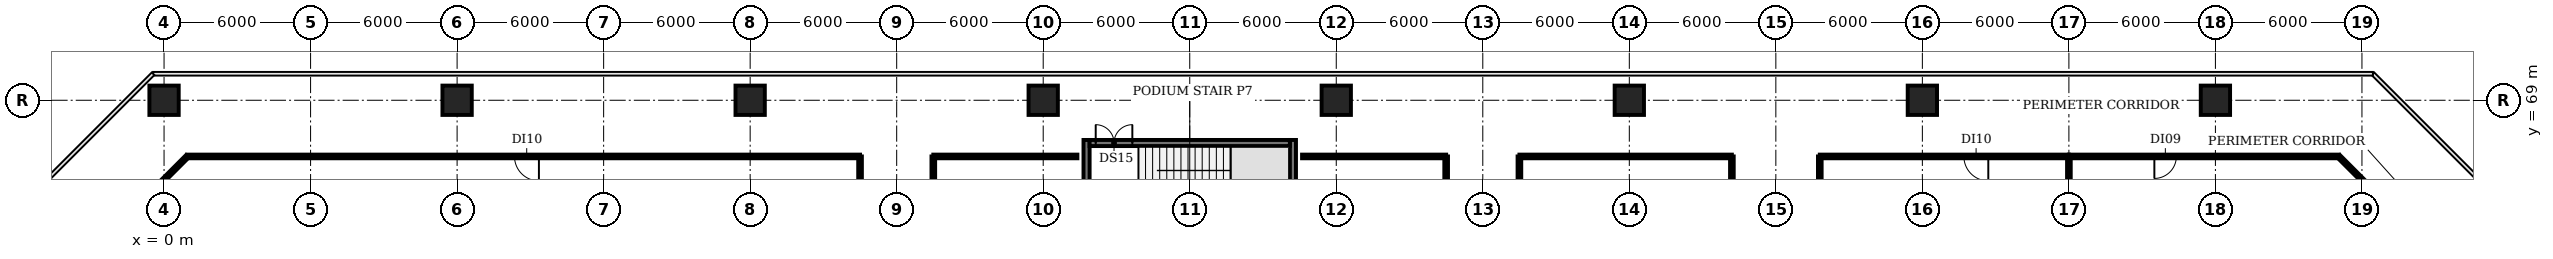
"""IFC4 building model, lengths in metres.
Left out: names, types, materials, properties, quantities, classifications, styles, units other than length and angle.
Written with IfcOpenShell. Run it as: python <this file> out.ifc"""

import sys

from ifc_helpers import new_model, si_unit, direction, frame, frame_2d, origin, origin_2d, place, context, subcontext, project, spatial, rectangle, extrude, element, fill, save


model = new_model("IFC4")
c1 = context("Model", 3, precision=1e-05, world=origin(), true_north=direction((0.0, 1.0)))
c2 = subcontext(c1, "Body", "Model", "MODEL_VIEW")
j1 = project(units=[si_unit("LENGTHUNIT", "METRE"), si_unit("PLANEANGLEUNIT", "RADIAN")], contexts=[c1])
p1 = place(None, origin())
s1 = spatial("IfcSite", under=j1, at=p1, CompositionType="ELEMENT")
p2 = place(p1, origin())
s2 = spatial("IfcBuilding", under=s1, at=p2, CompositionType="ELEMENT")
p3 = place(p2, frame((0.0, 0.0, 6.0)))
s3 = spatial("IfcBuildingStorey", under=s2, at=p3, CompositionType="ELEMENT", Elevation=6.0)
for number, where, z_axis, x_axis in (
    (1, (0.0, 69.0, 0.0), (0.0, 0.0, 1.0), (1.0, 0.0, 0.0)),
    (2, (12.0, 69.0, 0.0), (0.0, 0.0, 1.0), (1.0, 0.0, 0.0)),
    (3, (24.0, 69.0, 0.0), (0.0, 0.0, 1.0), (1.0, 0.0, 0.0)),
    (4, (36.0, 69.0, 0.0), (0.0, 0.0, 1.0), (1.0, 0.0, 0.0)),
    (5, (48.0, 69.0, 0.0), (0.0, 0.0, 1.0), (1.0, 0.0, 0.0)),
    (6, (60.0, 69.0, 0.0), (0.0, 0.0, 1.0), (1.0, 0.0, 0.0)),
    (7, (72.0, 69.0, 0.0), (0.0, 0.0, 1.0), (1.0, 0.0, 0.0)),
    (8, (84.0, 69.0, 0.0), (0.0, 0.0, 1.0), (1.0, 0.0, 0.0)),
):
    element("IfcColumn", number, at=place(p3, frame(where, z_axis=z_axis, x_axis=x_axis)), inside=s3, PredefinedType="COLUMN", context=c2, shape_type="SweptSolid", body=[
        extrude(rectangle(XDim=1.2, YDim=1.2, at=origin_2d()), origin(), (0.0, 0.0, 1.0), 4.6),
    ])
for number, where, z_axis, x_axis in (
    (9, (37.775, 62.725, 0.0), (0.0, 0.0, 1.0), (0.0, 1.0, 0.0)),
    (10, (46.225, 62.725, 0.0), (0.0, 0.0, 1.0), (0.0, 1.0, 0.0)),
):
    element("IfcWall", number, at=place(p3, frame(where, z_axis=z_axis, x_axis=x_axis)), inside=s3, PredefinedType="SHEAR", context=c2, shape_type="SweptSolid", body=[
        extrude(rectangle(XDim=4.65, YDim=0.25, at=frame_2d((2.325, 0.0))), origin(), (0.0, 0.0, 1.0), 4.6),
    ])
p4 = place(p3, frame((37.9, 67.25, 0.0), z_axis=(0.0, 0.0, 1.0), x_axis=(1.0, 0.0, 0.0)))
e11 = element("IfcWall", 11, at=p4, inside=s3, PredefinedType="SHEAR", context=c2, shape_type="SweptSolid", body=[
    extrude(rectangle(XDim=8.2, YDim=0.25, at=frame_2d((4.1, 0.0))), origin(), (0.0, 0.0, 1.0), 4.6),
])
p5 = place(p4, frame((0.25, 0.0, 0.0)))
e12 = element("IfcOpeningElement", 12, at=p5, cuts=e11, PredefinedType="OPENING", context=c2, shape_type="SweptSolid", body=[
    extrude(rectangle(XDim=1.5, YDim=2.1, at=frame_2d((0.75, 1.05))), frame((0.0, 0.135, 0.0), z_axis=(0.0, -1.0, 0.0), x_axis=(1.0, 0.0, 0.0)), (0.0, 0.0, 1.0), 0.27),
])
p6 = place(p3, frame((-4.013, 61.737, 0.0), z_axis=(0.0, 0.0, 1.0), x_axis=(0.707106781187, 0.707106781187, 0.0)))
e13 = element("IfcWall", 13, at=p6, inside=s3, PredefinedType="PARTITIONING", context=c2, shape_type="SweptSolid", body=[
    extrude(rectangle(XDim=7.019, YDim=0.15, at=frame_2d((3.51, 0.0))), origin(), (0.0, 0.0, 1.0), 3.18),
])
p7 = place(p3, frame((28.5, 61.2, 0.0), z_axis=(0.0, 0.0, 1.0), x_axis=(0.0, 1.0, 0.0)))
e14 = element("IfcWall", 14, at=p7, inside=s3, PredefinedType="PARTITIONING", context=c2, shape_type="SweptSolid", body=[
    extrude(rectangle(XDim=5.5, YDim=0.15, at=frame_2d((2.75, 0.0))), origin(), (0.0, 0.0, 1.0), 3.18),
])
p8 = place(p3, frame((28.5, 66.7, 0.0), z_axis=(0.0, 0.0, 1.0), x_axis=(-1.0, 0.0, 0.0)))
e15 = element("IfcWall", 15, at=p8, inside=s3, PredefinedType="PARTITIONING", context=c2, shape_type="SweptSolid", body=[
    extrude(rectangle(XDim=27.55, YDim=0.15, at=frame_2d((13.775, 0.0))), origin(), (0.0, 0.0, 1.0), 3.18),
])
p9 = place(p8, frame((13.15, 0.0, 0.0)))
e16 = element("IfcOpeningElement", 16, at=p9, cuts=e15, PredefinedType="OPENING", context=c2, shape_type="SweptSolid", body=[
    extrude(rectangle(XDim=1.0, YDim=2.1, at=frame_2d((0.5, 1.05))), frame((0.0, 0.085, 0.0), z_axis=(0.0, -1.0, 0.0), x_axis=(1.0, 0.0, 0.0)), (0.0, 0.0, 1.0), 0.17),
])
p10 = place(p3, frame((31.5, 54.77, 0.0), z_axis=(0.0, 0.0, 1.0), x_axis=(0.0, 1.0, 0.0)))
e17 = element("IfcWall", 17, at=p10, inside=s3, PredefinedType="PARTITIONING", context=c2, shape_type="SweptSolid", body=[
    extrude(rectangle(XDim=11.93, YDim=0.15, at=frame_2d((5.965, 0.0))), origin(), (0.0, 0.0, 1.0), 3.18),
])
p11 = place(p10, frame((5.0, 0.0, 0.0)))
e18 = element("IfcOpeningElement", 18, at=p11, cuts=e17, PredefinedType="OPENING", context=c2, shape_type="SweptSolid", body=[
    extrude(rectangle(XDim=1.8, YDim=2.1, at=frame_2d((0.9, 1.05))), frame((0.0, 0.085, 0.0), z_axis=(0.0, -1.0, 0.0), x_axis=(1.0, 0.0, 0.0)), (0.0, 0.0, 1.0), 0.17),
])
for number, where, z_axis, x_axis in (
    (19, (31.5, 66.7, 0.0), (0.0, 0.0, 1.0), (1.0, 0.0, 0.0)),
    (20, (46.6, 66.7, 0.0), (0.0, 0.0, 1.0), (1.0, 0.0, 0.0)),
):
    element("IfcWall", number, at=place(p3, frame(where, z_axis=z_axis, x_axis=x_axis)), inside=s3, PredefinedType="PARTITIONING", context=c2, shape_type="SweptSolid", body=[
        extrude(rectangle(XDim=5.9, YDim=0.15, at=frame_2d((2.95, 0.0))), origin(), (0.0, 0.0, 1.0), 3.18),
    ])
p12 = place(p3, frame((52.5, 66.7, 0.0), z_axis=(0.0, 0.0, 1.0), x_axis=(0.0, -1.0, 0.0)))
e21 = element("IfcWall", 21, at=p12, inside=s3, PredefinedType="PARTITIONING", context=c2, shape_type="SweptSolid", body=[
    extrude(rectangle(XDim=11.93, YDim=0.15, at=frame_2d((5.965, 0.0))), origin(), (0.0, 0.0, 1.0), 3.18),
])
p13 = place(p12, frame((5.0, 0.0, 0.0)))
e22 = element("IfcOpeningElement", 22, at=p13, cuts=e21, PredefinedType="OPENING", context=c2, shape_type="SweptSolid", body=[
    extrude(rectangle(XDim=1.8, YDim=2.1, at=frame_2d((0.9, 1.05))), frame((0.0, 0.085, 0.0), z_axis=(0.0, -1.0, 0.0), x_axis=(1.0, 0.0, 0.0)), (0.0, 0.0, 1.0), 0.17),
])
p14 = place(p3, frame((55.5, 30.9, 0.0), z_axis=(0.0, 0.0, 1.0), x_axis=(0.0, 1.0, 0.0)))
e23 = element("IfcWall", 23, at=p14, inside=s3, PredefinedType="PARTITIONING", context=c2, shape_type="SweptSolid", body=[
    extrude(rectangle(XDim=35.8, YDim=0.15, at=frame_2d((17.9, 0.0))), origin(), (0.0, 0.0, 1.0), 3.18),
])
p15 = place(p3, frame((55.5, 66.7, 0.0), z_axis=(0.0, 0.0, 1.0), x_axis=(1.0, 0.0, 0.0)))
e24 = element("IfcWall", 24, at=p15, inside=s3, PredefinedType="PARTITIONING", context=c2, shape_type="SweptSolid", body=[
    extrude(rectangle(XDim=8.7, YDim=0.15, at=frame_2d((4.35, 0.0))), origin(), (0.0, 0.0, 1.0), 3.18),
])
p16 = place(p3, frame((64.2, 57.75, 0.0), z_axis=(0.0, 0.0, 1.0), x_axis=(0.0, 1.0, 0.0)))
e25 = element("IfcWall", 25, at=p16, inside=s3, PredefinedType="PARTITIONING", context=c2, shape_type="SweptSolid", body=[
    extrude(rectangle(XDim=8.95, YDim=0.15, at=frame_2d((4.475, 0.0))), origin(), (0.0, 0.0, 1.0), 3.18),
])
p17 = place(p16, frame((3.85, 0.0, 0.0)))
e26 = element("IfcOpeningElement", 26, at=p17, cuts=e25, PredefinedType="OPENING", context=c2, shape_type="SweptSolid", body=[
    extrude(rectangle(XDim=1.0, YDim=2.1, at=frame_2d((0.5, 1.05))), frame((0.0, 0.085, 0.0), z_axis=(0.0, -1.0, 0.0), x_axis=(1.0, 0.0, 0.0)), (0.0, 0.0, 1.0), 0.17),
])
p18 = place(p3, frame((67.8, 60.73, 0.0), z_axis=(0.0, 0.0, 1.0), x_axis=(0.0, 1.0, 0.0)))
e27 = element("IfcWall", 27, at=p18, inside=s3, PredefinedType="PARTITIONING", context=c2, shape_type="SweptSolid", body=[
    extrude(rectangle(XDim=5.97, YDim=0.15, at=frame_2d((2.985, 0.0))), origin(), (0.0, 0.0, 1.0), 3.18),
])
p19 = place(p3, frame((78.0, 30.9, 0.0), z_axis=(0.0, 0.0, 1.0), x_axis=(0.0, 1.0, 0.0)))
e28 = element("IfcWall", 28, at=p19, inside=s3, PredefinedType="PARTITIONING", context=c2, shape_type="SweptSolid", body=[
    extrude(rectangle(XDim=35.8, YDim=0.15, at=frame_2d((17.9, 0.0))), origin(), (0.0, 0.0, 1.0), 3.18),
])
p20 = place(p3, frame((78.0, 66.7, 0.0), z_axis=(0.0, 0.0, 1.0), x_axis=(-1.0, 0.0, 0.0)))
e29 = element("IfcWall", 29, at=p20, inside=s3, PredefinedType="PARTITIONING", context=c2, shape_type="SweptSolid", body=[
    extrude(rectangle(XDim=10.2, YDim=0.15, at=frame_2d((5.1, 0.0))), origin(), (0.0, 0.0, 1.0), 3.18),
])
p21 = place(p20, frame((3.3, 0.0, 0.0)))
e30 = element("IfcOpeningElement", 30, at=p21, cuts=e29, PredefinedType="OPENING", context=c2, shape_type="SweptSolid", body=[
    extrude(rectangle(XDim=1.0, YDim=2.1, at=frame_2d((0.5, 1.05))), frame((0.0, 0.085, 0.0), z_axis=(0.0, -1.0, 0.0), x_axis=(1.0, 0.0, 0.0)), (0.0, 0.0, 1.0), 0.17),
])
p22 = place(p3, frame((89.05, 66.7, 0.0), z_axis=(0.0, 0.0, 1.0), x_axis=(-1.0, 0.0, 0.0)))
e31 = element("IfcWall", 31, at=p22, inside=s3, PredefinedType="PARTITIONING", context=c2, shape_type="SweptSolid", body=[
    extrude(rectangle(XDim=11.05, YDim=0.15, at=frame_2d((5.525, 0.0))), origin(), (0.0, 0.0, 1.0), 3.18),
])
p23 = place(p22, frame((6.65, 0.0, 0.0)))
e32 = element("IfcOpeningElement", 32, at=p23, cuts=e31, PredefinedType="OPENING", context=c2, shape_type="SweptSolid", body=[
    extrude(rectangle(XDim=0.9, YDim=2.1, at=frame_2d((0.45, 1.05))), frame((0.0, 0.085, 0.0), z_axis=(0.0, -1.0, 0.0), x_axis=(1.0, 0.0, 0.0)), (0.0, 0.0, 1.0), 0.17),
])
p24 = place(p3, frame((89.05, 66.7, 0.0), z_axis=(0.0, 0.0, 1.0), x_axis=(0.707106781187, -0.707106781187, 0.0)))
e33 = element("IfcWall", 33, at=p24, inside=s3, PredefinedType="PARTITIONING", context=c2, shape_type="SweptSolid", body=[
    extrude(rectangle(XDim=6.576, YDim=0.15, at=frame_2d((3.288, 0.0))), origin(), (0.0, 0.0, 1.0), 3.18),
])
p25 = place(p5, origin())
e34 = element("IfcDoor", 34, at=p25, inside=s3, OperationType="DOUBLE_DOOR_SINGLE_SWING", PredefinedType="DOOR", context=c2, shape_type="SweptSolid", body=[
    extrude(rectangle(XDim=1.5, YDim=2.1, at=frame_2d((0.75, 1.05))), frame((0.0, 0.025, 0.0), z_axis=(0.0, -1.0, 0.0), x_axis=(1.0, 0.0, 0.0)), (0.0, 0.0, 1.0), 0.05),
])
fill(e12, e34)
p26 = place(p9, origin())
e35 = element("IfcDoor", 35, at=p26, inside=s3, OperationType="SINGLE_SWING_LEFT", PredefinedType="DOOR", context=c2, shape_type="SweptSolid", body=[
    extrude(rectangle(XDim=1.0, YDim=2.1, at=frame_2d((0.5, 1.05))), frame((0.0, 0.025, 0.0), z_axis=(0.0, -1.0, 0.0), x_axis=(1.0, 0.0, 0.0)), (0.0, 0.0, 1.0), 0.05),
])
fill(e16, e35)
p27 = place(p21, origin())
e36 = element("IfcDoor", 36, at=p27, inside=s3, OperationType="SINGLE_SWING_LEFT", PredefinedType="DOOR", context=c2, shape_type="SweptSolid", body=[
    extrude(rectangle(XDim=1.0, YDim=2.1, at=frame_2d((0.5, 1.05))), frame((0.0, 0.025, 0.0), z_axis=(0.0, -1.0, 0.0), x_axis=(1.0, 0.0, 0.0)), (0.0, 0.0, 1.0), 0.05),
])
fill(e30, e36)
p28 = place(p23, origin())
e37 = element("IfcDoor", 37, at=p28, inside=s3, OperationType="SINGLE_SWING_RIGHT", PredefinedType="DOOR", context=c2, shape_type="SweptSolid", body=[
    extrude(rectangle(XDim=0.9, YDim=2.1, at=frame_2d((0.45, 1.05))), frame((0.0, 0.025, 0.0), z_axis=(0.0, -1.0, 0.0), x_axis=(1.0, 0.0, 0.0)), (0.0, 0.0, 1.0), 0.05),
])
fill(e32, e37)
save(model, sys.argv[1])
